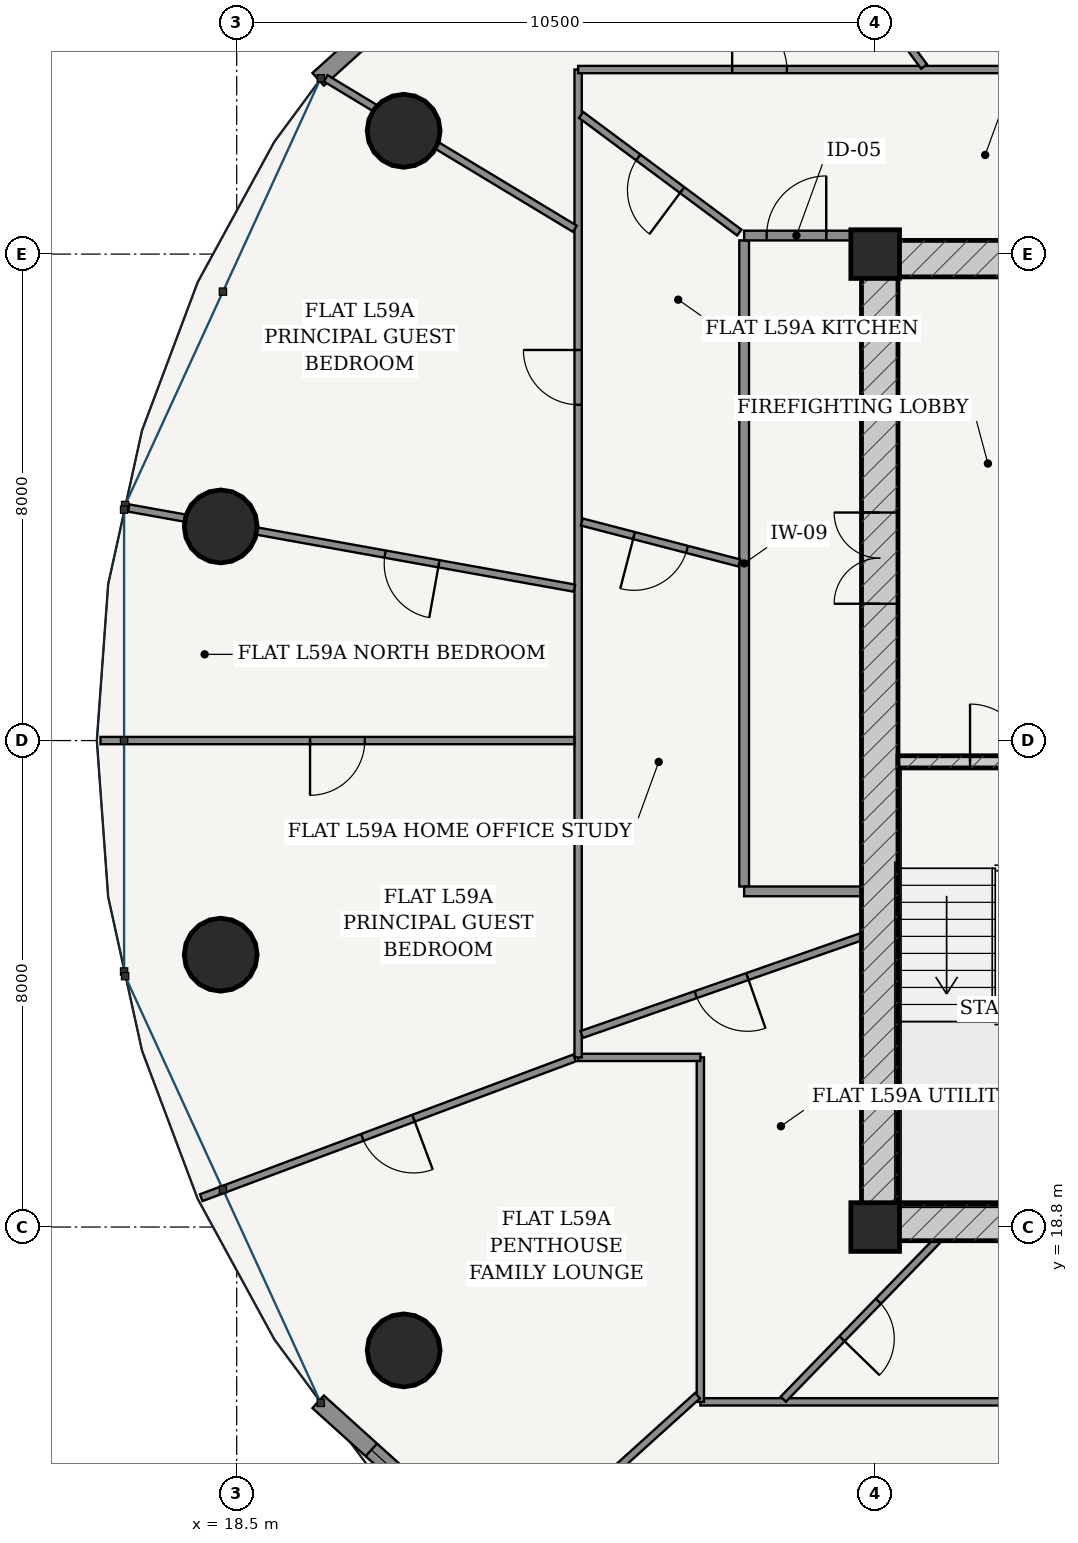
"""IFC4 building model, lengths in metres.
Left out: names, types, materials, properties, quantities, classifications, styles, units other than length and angle.
Written with IfcOpenShell. Run it as: python <this file> out.ifc"""

import sys

from ifc_helpers import new_model, si_unit, direction, frame, frame_2d, origin, origin_2d, place, context, subcontext, project, spatial, rectangle, hollow_circle, extrude, source, transform, mapped, element, fill, save


model = new_model("IFC4")
c1 = context("Model", 3, precision=1e-05, world=origin(), true_north=direction((-0.2419218956, 0.970295726276)))
c2 = subcontext(c1, "Body", "Model", "MODEL_VIEW")
j1 = project(units=[si_unit("LENGTHUNIT", "METRE"), si_unit("PLANEANGLEUNIT", "RADIAN")], contexts=[c1])
p1 = place(None, origin())
s1 = spatial("IfcSite", under=j1, at=p1, CompositionType="ELEMENT")
p2 = place(p1, origin())
s2 = spatial("IfcBuilding", under=s1, at=p2, CompositionType="ELEMENT")
p3 = place(p2, frame((0.0, 0.0, 224.5)))
s3 = spatial("IfcBuildingStorey", under=s2, at=p3, CompositionType="ELEMENT", Elevation=224.5)
for number, where, z_axis, x_axis in (
    (1, (29.0, 18.8, 0.0), (0.0, 0.0, 1.0), (1.0, 0.0, 0.0)),
    (2, (29.0, 34.8, 0.0), (0.0, 0.0, 1.0), (1.0, 0.0, 0.0)),
):
    element("IfcColumn", number, at=place(p3, frame(where, z_axis=z_axis, x_axis=x_axis)), inside=s3, PredefinedType="COLUMN", context=c2, shape_type="SweptSolid", body=[
        extrude(rectangle(XDim=0.8, YDim=0.8, at=origin_2d()), origin(), (0.0, 0.0, 1.0), 3.7),
    ])
p4 = place(p3, frame((28.775, 18.875, 0.0), z_axis=(0.0, 0.0, 1.0), x_axis=(1.0, 0.0, 0.0)))
e3 = element("IfcWall", 3, at=p4, inside=s3, PredefinedType="SHEAR", context=c2, shape_type="SweptSolid", body=[
    extrude(rectangle(XDim=18.45, YDim=0.6, at=frame_2d((9.225, 0.0))), origin(), (0.0, 0.0, 1.0), 3.435),
])
p5 = place(p4, frame((8.8, 0.0, 0.0)))
e4 = element("IfcOpeningElement", 4, at=p5, cuts=e3, PredefinedType="OPENING", context=c2, shape_type="SweptSolid", body=[
    extrude(rectangle(XDim=0.85, YDim=2.1, at=frame_2d((0.425, 1.05))), frame((0.0, 0.31, 0.0), z_axis=(0.0, -1.0, 0.0), x_axis=(1.0, 0.0, 0.0)), (0.0, 0.0, 1.0), 0.62),
])
p6 = place(p3, frame((28.775, 34.725, 0.0), z_axis=(0.0, 0.0, 1.0), x_axis=(1.0, 0.0, 0.0)))
e5 = element("IfcWall", 5, at=p6, inside=s3, PredefinedType="SHEAR", context=c2, shape_type="SweptSolid", body=[
    extrude(rectangle(XDim=18.45, YDim=0.6, at=frame_2d((9.225, 0.0))), origin(), (0.0, 0.0, 1.0), 3.435),
])
p7 = place(p3, frame((29.075, 19.175, 0.0), z_axis=(0.0, 0.0, 1.0), x_axis=(0.0, 1.0, 0.0)))
e6 = element("IfcWall", 6, at=p7, inside=s3, PredefinedType="SHEAR", context=c2, shape_type="SweptSolid", body=[
    extrude(rectangle(XDim=15.25, YDim=0.6, at=frame_2d((7.625, 0.0))), origin(), (0.0, 0.0, 1.0), 3.435),
])
p8 = place(p7, frame((9.875, 0.0, 0.0)))
e7 = element("IfcOpeningElement", 7, at=p8, cuts=e6, PredefinedType="OPENING", context=c2, shape_type="SweptSolid", body=[
    extrude(rectangle(XDim=1.5, YDim=2.2, at=frame_2d((0.75, 1.1))), frame((0.0, 0.31, 0.0), z_axis=(0.0, -1.0, 0.0), x_axis=(1.0, 0.0, 0.0)), (0.0, 0.0, 1.0), 0.62),
])
p9 = place(p3, frame((29.375, 26.45, 0.0), z_axis=(0.0, 0.0, 1.0), x_axis=(1.0, 0.0, 0.0)))
e8 = element("IfcWall", 8, at=p9, inside=s3, PredefinedType="SOLIDWALL", context=c2, shape_type="SweptSolid", body=[
    extrude(rectangle(XDim=3.32, YDim=0.2, at=frame_2d((1.66, 0.0))), origin(), (0.0, 0.0, 1.0), 3.435),
])
p10 = place(p9, frame((1.185, 0.0, 0.0)))
e9 = element("IfcOpeningElement", 9, at=p10, cuts=e8, PredefinedType="OPENING", context=c2, shape_type="SweptSolid", body=[
    extrude(rectangle(XDim=0.95, YDim=2.15, at=frame_2d((0.475, 1.075))), frame((0.0, 0.11, 0.0), z_axis=(0.0, -1.0, 0.0), x_axis=(1.0, 0.0, 0.0)), (0.0, 0.0, 1.0), 0.22),
])
for number, where, z_axis, x_axis in (
    (10, (21.246, 36.828, 0.0), (0.0, 0.0, 1.0), (1.0, 0.0, 0.0)),
    (11, (18.237, 30.321, 0.0), (0.0, 0.0, 1.0), (1.0, 0.0, 0.0)),
    (12, (18.237, 23.279, 0.0), (0.0, 0.0, 1.0), (1.0, 0.0, 0.0)),
    (13, (21.246, 16.772, 0.0), (0.0, 0.0, 1.0), (1.0, 0.0, 0.0)),
):
    element("IfcColumn", number, at=place(p3, frame(where, z_axis=z_axis, x_axis=x_axis)), inside=s3, PredefinedType="COLUMN", context=c2, shape_type="SweptSolid", body=[
        extrude(hollow_circle(Radius=0.6, WallThickness=0.038, at=origin_2d()), origin(), (0.0, 0.0, 1.0), 3.7),
    ])
p11 = place(p3, frame((25.965, 43.209, 0.0), z_axis=(0.0, 0.0, 1.0), x_axis=(-0.741972126783, -0.670430729514, 0.0)))
e14 = element("IfcWall", 14, at=p11, inside=s3, PredefinedType="SOLIDWALL", context=c2, shape_type="SweptSolid", body=[
    extrude(rectangle(XDim=8.255, YDim=0.28, at=frame_2d((4.127, 0.0))), origin(), (0.0, 0.0, 1.0), 3.435),
])
p12 = place(p11, frame((1.179, 0.0, 0.85)))
e15 = element("IfcOpeningElement", 15, at=p12, cuts=e14, PredefinedType="OPENING", context=c2, shape_type="SweptSolid", body=[
    extrude(rectangle(XDim=2.1, YDim=1.95, at=frame_2d((1.05, 0.975))), frame((0.0, 0.15, 0.0), z_axis=(0.0, -1.0, 0.0), x_axis=(1.0, 0.0, 0.0)), (0.0, 0.0, 1.0), 0.3),
])
p13 = place(p11, frame((4.976, 0.0, 0.85)))
e16 = element("IfcOpeningElement", 16, at=p13, cuts=e14, PredefinedType="OPENING", context=c2, shape_type="SweptSolid", body=[
    extrude(rectangle(XDim=2.1, YDim=1.95, at=frame_2d((1.05, 0.975))), frame((0.0, 0.15, 0.0), z_axis=(0.0, -1.0, 0.0), x_axis=(1.0, 0.0, 0.0)), (0.0, 0.0, 1.0), 0.3),
])
p14 = place(p3, frame((19.84, 15.926, 0.0), z_axis=(0.0, 0.0, 1.0), x_axis=(0.741986838603, -0.670414447443, 0.0)))
e17 = element("IfcWall", 17, at=p14, inside=s3, PredefinedType="SOLIDWALL", context=c2, shape_type="SweptSolid", body=[
    extrude(rectangle(XDim=8.255, YDim=0.28, at=frame_2d((4.127, 0.0))), origin(), (0.0, 0.0, 1.0), 3.435),
])
p15 = place(p14, frame((1.179, 0.0, 0.85)))
e18 = element("IfcOpeningElement", 18, at=p15, cuts=e17, PredefinedType="OPENING", context=c2, shape_type="SweptSolid", body=[
    extrude(rectangle(XDim=2.1, YDim=1.95, at=frame_2d((1.05, 0.975))), frame((0.0, 0.15, 0.0), z_axis=(0.0, -1.0, 0.0), x_axis=(1.0, 0.0, 0.0)), (0.0, 0.0, 1.0), 0.3),
])
p16 = place(p14, frame((4.976, 0.0, 0.85)))
e19 = element("IfcOpeningElement", 19, at=p16, cuts=e17, PredefinedType="OPENING", context=c2, shape_type="SweptSolid", body=[
    extrude(rectangle(XDim=2.1, YDim=1.95, at=frame_2d((1.05, 0.975))), frame((0.0, 0.15, 0.0), z_axis=(0.0, -1.0, 0.0), x_axis=(1.0, 0.0, 0.0)), (0.0, 0.0, 1.0), 0.3),
])
p17 = place(p3, frame((26.845, 24.4, 0.0), z_axis=(0.0, 0.0, 1.0), x_axis=(0.0, 1.0, 0.0)))
e20 = element("IfcWall", 20, at=p17, inside=s3, PredefinedType="PARTITIONING", context=c2, shape_type="SweptSolid", body=[
    extrude(rectangle(XDim=10.625, YDim=0.16, at=frame_2d((5.312, 0.0))), origin(), (0.0, 0.0, 1.0), 2.951),
])
p18 = place(p3, frame((26.845, 35.105, 0.0), z_axis=(0.0, 0.0, 1.0), x_axis=(1.0, 0.0, 0.0)))
e21 = element("IfcWall", 21, at=p18, inside=s3, PredefinedType="PARTITIONING", context=c2, shape_type="SweptSolid", body=[
    extrude(rectangle(XDim=1.93, YDim=0.16, at=frame_2d((0.965, 0.0))), origin(), (0.0, 0.0, 1.0), 3.435),
])
p19 = place(p18, frame((0.37, 0.0, 0.0)))
e22 = element("IfcOpeningElement", 22, at=p19, cuts=e21, PredefinedType="OPENING", context=c2, shape_type="SweptSolid", body=[
    extrude(rectangle(XDim=0.98, YDim=2.2, at=frame_2d((0.49, 1.1))), frame((0.0, 0.09, 0.0), z_axis=(0.0, -1.0, 0.0), x_axis=(1.0, 0.0, 0.0)), (0.0, 0.0, 1.0), 0.18),
])
p20 = place(p3, frame((26.845, 24.32, 0.0), z_axis=(0.0, 0.0, 1.0), x_axis=(1.0, 0.0, 0.0)))
e23 = element("IfcWall", 23, at=p20, inside=s3, PredefinedType="PARTITIONING", context=c2, shape_type="SweptSolid", body=[
    extrude(rectangle(XDim=1.93, YDim=0.16, at=frame_2d((0.965, 0.0))), origin(), (0.0, 0.0, 1.0), 3.435),
])
p21 = place(p3, frame((31.59, 15.925, 0.0), z_axis=(0.0, 0.0, 1.0), x_axis=(-1.0, 0.0, 0.0)))
e24 = element("IfcWall", 24, at=p21, inside=s3, PredefinedType="PARTITIONING", context=c2, shape_type="SweptSolid", body=[
    extrude(rectangle(XDim=5.465, YDim=0.12, at=frame_2d((2.732, 0.0))), origin(), (0.0, 0.0, 1.0), 2.951),
])
p22 = place(p3, frame((26.125, 15.925, 0.0), z_axis=(0.0, 0.0, 1.0), x_axis=(0.0, 1.0, 0.0)))
e25 = element("IfcWall", 25, at=p22, inside=s3, PredefinedType="PARTITIONING", context=c2, shape_type="SweptSolid", body=[
    extrude(rectangle(XDim=5.665, YDim=0.12, at=frame_2d((2.833, 0.0))), origin(), (0.0, 0.0, 1.0), 2.951),
])
p23 = place(p3, frame((26.125, 21.59, 0.0), z_axis=(0.0, 0.0, 1.0), x_axis=(-1.0, 0.0, 0.0)))
e26 = element("IfcWall", 26, at=p23, inside=s3, PredefinedType="PARTITIONING", context=c2, shape_type="SweptSolid", body=[
    extrude(rectangle(XDim=2.01, YDim=0.12, at=frame_2d((1.005, 0.0))), origin(), (0.0, 0.0, 1.0), 3.11),
])
p24 = place(p3, frame((24.115, 21.59, 0.0), z_axis=(0.0, 0.0, 1.0), x_axis=(0.0, 1.0, 0.0)))
e27 = element("IfcWall", 27, at=p24, inside=s3, PredefinedType="PARTITIONING", context=c2, shape_type="SweptSolid", body=[
    extrude(rectangle(XDim=16.245, YDim=0.12, at=frame_2d((8.123, 0.0))), origin(), (0.0, 0.0, 1.0), 2.951),
])
p25 = place(p24, frame((10.733, 0.0, 0.0)))
e28 = element("IfcOpeningElement", 28, at=p25, cuts=e27, PredefinedType="OPENING", context=c2, shape_type="SweptSolid", body=[
    extrude(rectangle(XDim=0.9, YDim=2.15, at=frame_2d((0.45, 1.075))), frame((0.0, 0.07, 0.0), z_axis=(0.0, -1.0, 0.0), x_axis=(1.0, 0.0, 0.0)), (0.0, 0.0, 1.0), 0.14),
])
p26 = place(p3, frame((24.115, 37.835, 0.0), z_axis=(0.0, 0.0, 1.0), x_axis=(1.0, 0.0, 0.0)))
e29 = element("IfcWall", 29, at=p26, inside=s3, PredefinedType="PARTITIONING", context=c2, shape_type="SweptSolid", body=[
    extrude(rectangle(XDim=7.47, YDim=0.12, at=frame_2d((3.735, 0.0))), origin(), (0.0, 0.0, 1.0), 2.951),
])
p27 = place(p26, frame((2.533, 0.0, 0.0)))
e30 = element("IfcOpeningElement", 30, at=p27, cuts=e29, PredefinedType="OPENING", context=c2, shape_type="SweptSolid", body=[
    extrude(rectangle(XDim=0.9, YDim=2.15, at=frame_2d((0.45, 1.075))), frame((0.0, 0.07, 0.0), z_axis=(0.0, -1.0, 0.0), x_axis=(1.0, 0.0, 0.0)), (0.0, 0.0, 1.0), 0.14),
])
p28 = place(p3, frame((29.804, 37.885, 0.0), z_axis=(0.0, 0.0, 1.0), x_axis=(-0.594507557292, 0.804090022524, 0.0)))
e31 = element("IfcWall", 31, at=p28, inside=s3, PredefinedType="PARTITIONING", context=c2, shape_type="SweptSolid", body=[
    extrude(rectangle(XDim=6.481, YDim=0.12, at=frame_2d((3.241, 0.0))), origin(), (0.0, 0.0, 1.0), 2.951),
])
p29 = place(p3, frame((24.062, 35.216, 0.0), z_axis=(0.0, 0.0, 1.0), x_axis=(-0.856058483833, 0.516878972543, 0.0)))
e32 = element("IfcWall", 32, at=p29, inside=s3, PredefinedType="PARTITIONING", context=c2, shape_type="SweptSolid", body=[
    extrude(rectangle(XDim=4.787, YDim=0.12, at=frame_2d((2.393, 0.0))), origin(), (0.0, 0.0, 1.0), 2.951),
])
p30 = place(p3, frame((24.054, 29.307, 0.0), z_axis=(0.0, 0.0, 1.0), x_axis=(-0.984227185588, 0.176909149424, 0.0)))
e33 = element("IfcWall", 33, at=p30, inside=s3, PredefinedType="PARTITIONING", context=c2, shape_type="SweptSolid", body=[
    extrude(rectangle(XDim=7.448, YDim=0.12, at=frame_2d((3.724, 0.0))), origin(), (0.0, 0.0, 1.0), 2.951),
])
p31 = place(p30, frame((2.264, 0.0, 0.0)))
e34 = element("IfcOpeningElement", 34, at=p31, cuts=e33, PredefinedType="OPENING", context=c2, shape_type="SweptSolid", body=[
    extrude(rectangle(XDim=0.9, YDim=2.15, at=frame_2d((0.45, 1.075))), frame((0.0, 0.07, 0.0), z_axis=(0.0, -1.0, 0.0), x_axis=(1.0, 0.0, 0.0)), (0.0, 0.0, 1.0), 0.14),
])
p32 = place(p3, frame((24.053, 26.8, 0.0), z_axis=(0.0, 0.0, 1.0), x_axis=(-1.0, 0.0, 0.0)))
e35 = element("IfcWall", 35, at=p32, inside=s3, PredefinedType="PARTITIONING", context=c2, shape_type="SweptSolid", body=[
    extrude(rectangle(XDim=7.793, YDim=0.12, at=frame_2d((3.896, 0.0))), origin(), (0.0, 0.0, 1.0), 2.951),
])
p33 = place(p32, frame((3.447, 0.0, 0.0)))
e36 = element("IfcOpeningElement", 36, at=p33, cuts=e35, PredefinedType="OPENING", context=c2, shape_type="SweptSolid", body=[
    extrude(rectangle(XDim=0.9, YDim=2.15, at=frame_2d((0.45, 1.075))), frame((0.0, 0.07, 0.0), z_axis=(0.0, -1.0, 0.0), x_axis=(1.0, 0.0, 0.0)), (0.0, 0.0, 1.0), 0.14),
])
p34 = place(p3, frame((24.057, 21.581, 0.0), z_axis=(0.0, 0.0, 1.0), x_axis=(-0.936527968377, -0.350592875637, 0.0)))
e37 = element("IfcWall", 37, at=p34, inside=s3, PredefinedType="PARTITIONING", context=c2, shape_type="SweptSolid", body=[
    extrude(rectangle(XDim=6.556, YDim=0.12, at=frame_2d((3.278, 0.0))), origin(), (0.0, 0.0, 1.0), 2.951),
])
p35 = place(p34, frame((2.828, 0.0, 0.0)))
e38 = element("IfcOpeningElement", 38, at=p35, cuts=e37, PredefinedType="OPENING", context=c2, shape_type="SweptSolid", body=[
    extrude(rectangle(XDim=0.9, YDim=2.15, at=frame_2d((0.45, 1.075))), frame((0.0, 0.07, 0.0), z_axis=(0.0, -1.0, 0.0), x_axis=(1.0, 0.0, 0.0)), (0.0, 0.0, 1.0), 0.14),
])
p36 = place(p3, frame((26.079, 16.027, 0.0), z_axis=(0.0, 0.0, 1.0), x_axis=(-0.741950057395, -0.67045515311, 0.0)))
e39 = element("IfcWall", 39, at=p36, inside=s3, PredefinedType="PARTITIONING", context=c2, shape_type="SweptSolid", body=[
    extrude(rectangle(XDim=4.647, YDim=0.12, at=frame_2d((2.324, 0.0))), origin(), (0.0, 0.0, 1.0), 2.951),
])
p37 = place(p36, frame((1.874, 0.0, 0.0)))
e40 = element("IfcOpeningElement", 40, at=p37, cuts=e39, PredefinedType="OPENING", context=c2, shape_type="SweptSolid", body=[
    extrude(rectangle(XDim=0.9, YDim=2.15, at=frame_2d((0.45, 1.075))), frame((0.0, 0.07, 0.0), z_axis=(0.0, -1.0, 0.0), x_axis=(1.0, 0.0, 0.0)), (0.0, 0.0, 1.0), 0.14),
])
p38 = place(p3, frame((26.765, 35.154, 0.0), z_axis=(0.0, 0.0, 1.0), x_axis=(-0.802434587752, 0.596740087793, 0.0)))
e41 = element("IfcWall", 41, at=p38, inside=s3, PredefinedType="PARTITIONING", context=c2, shape_type="SweptSolid", body=[
    extrude(rectangle(XDim=3.24, YDim=0.12, at=frame_2d((1.62, 0.0))), origin(), (0.0, 0.0, 1.0), 3.11),
])
p39 = place(p38, frame((1.17, 0.0, 0.0)))
e42 = element("IfcOpeningElement", 42, at=p39, cuts=e41, PredefinedType="OPENING", context=c2, shape_type="SweptSolid", body=[
    extrude(rectangle(XDim=0.9, YDim=2.15, at=frame_2d((0.45, 1.075))), frame((0.0, 0.07, 0.0), z_axis=(0.0, -1.0, 0.0), x_axis=(1.0, 0.0, 0.0)), (0.0, 0.0, 1.0), 0.14),
])
p40 = place(p3, frame((26.765, 29.721, 0.0), z_axis=(0.0, 0.0, 1.0), x_axis=(-0.967824284298, 0.251627015092, 0.0)))
e43 = element("IfcWall", 43, at=p40, inside=s3, PredefinedType="PARTITIONING", context=c2, shape_type="SweptSolid", body=[
    extrude(rectangle(XDim=2.676, YDim=0.12, at=frame_2d((1.338, 0.0))), origin(), (0.0, 0.0, 1.0), 3.435),
])
p41 = place(p40, frame((0.888, 0.0, 0.0)))
e44 = element("IfcOpeningElement", 44, at=p41, cuts=e43, PredefinedType="OPENING", context=c2, shape_type="SweptSolid", body=[
    extrude(rectangle(XDim=0.9, YDim=2.15, at=frame_2d((0.45, 1.075))), frame((0.0, 0.07, 0.0), z_axis=(0.0, -1.0, 0.0), x_axis=(1.0, 0.0, 0.0)), (0.0, 0.0, 1.0), 0.14),
])
p42 = place(p3, frame((28.775, 23.575, 0.0), z_axis=(0.0, 0.0, 1.0), x_axis=(-0.943974645063, -0.330017983569, 0.0)))
e45 = element("IfcWall", 45, at=p42, inside=s3, PredefinedType="PARTITIONING", context=c2, shape_type="SweptSolid", body=[
    extrude(rectangle(XDim=4.875, YDim=0.12, at=frame_2d((2.437, 0.0))), origin(), (0.0, 0.0, 1.0), 3.11),
])
p43 = place(p42, frame((1.987, 0.0, 0.0)))
e46 = element("IfcOpeningElement", 46, at=p43, cuts=e45, PredefinedType="OPENING", context=c2, shape_type="SweptSolid", body=[
    extrude(rectangle(XDim=0.9, YDim=2.15, at=frame_2d((0.45, 1.075))), frame((0.0, 0.07, 0.0), z_axis=(0.0, -1.0, 0.0), x_axis=(1.0, 0.0, 0.0)), (0.0, 0.0, 1.0), 0.14),
])
p44 = place(p3, frame((30.018, 18.575, 0.0), z_axis=(0.0, 0.0, 1.0), x_axis=(-0.696436677683, -0.717618250867, 0.0)))
e47 = element("IfcWall", 47, at=p44, inside=s3, PredefinedType="PARTITIONING", context=c2, shape_type="SweptSolid", body=[
    extrude(rectangle(XDim=3.631, YDim=0.12, at=frame_2d((1.815, 0.0))), origin(), (0.0, 0.0, 1.0), 2.951),
])
p45 = place(p44, frame((1.385, 0.0, 0.0)))
e48 = element("IfcOpeningElement", 48, at=p45, cuts=e47, PredefinedType="OPENING", context=c2, shape_type="SweptSolid", body=[
    extrude(rectangle(XDim=0.86, YDim=2.15, at=frame_2d((0.43, 1.075))), frame((0.0, 0.07, 0.0), z_axis=(0.0, -1.0, 0.0), x_axis=(1.0, 0.0, 0.0)), (0.0, 0.0, 1.0), 0.14),
])
m1 = source(origin(), c2, "Body", "SweptSolid", [
    extrude(rectangle(XDim=2.1, YDim=1.95, at=frame_2d((1.05, 0.975))), frame((0.0, 0.03, 0.0), z_axis=(0.0, -1.0, 0.0), x_axis=(1.0, 0.0, 0.0)), (0.0, 0.0, 1.0), 0.06),
])
p46 = place(p15, origin())
e49 = element("IfcWindow", 49, at=p46, inside=s3, PartitioningType="SINGLE_PANEL", PredefinedType="WINDOW", context=c2, shape_type="MappedRepresentation", body=[
    mapped(m1, transform((0.0, 0.0, 0.0), scale=1.0)),
])
fill(e18, e49)
m2 = source(origin(), c2, "Body", "SweptSolid", [
    extrude(rectangle(XDim=1.5, YDim=2.2, at=frame_2d((0.75, 1.1))), frame((0.0, 0.025, 0.0), z_axis=(0.0, -1.0, 0.0), x_axis=(1.0, 0.0, 0.0)), (0.0, 0.0, 1.0), 0.05),
])
p47 = place(p8, origin())
e50 = element("IfcDoor", 50, at=p47, inside=s3, OperationType="DOUBLE_DOOR_SINGLE_SWING", PredefinedType="DOOR", context=c2, shape_type="MappedRepresentation", body=[
    mapped(m2, transform((0.0, 0.0, 0.0), scale=1.0)),
])
fill(e7, e50)
m3 = source(origin(), c2, "Body", "SweptSolid", [
    extrude(rectangle(XDim=0.95, YDim=2.15, at=frame_2d((0.475, 1.075))), frame((0.0, 0.025, 0.0), z_axis=(0.0, -1.0, 0.0), x_axis=(1.0, 0.0, 0.0)), (0.0, 0.0, 1.0), 0.05),
])
p48 = place(p10, origin())
e51 = element("IfcDoor", 51, at=p48, inside=s3, OperationType="SINGLE_SWING_LEFT", PredefinedType="DOOR", context=c2, shape_type="MappedRepresentation", body=[
    mapped(m3, transform((0.0, 0.0, 0.0), scale=1.0)),
])
fill(e9, e51)
m4 = source(origin(), c2, "Body", "SweptSolid", [
    extrude(rectangle(XDim=0.98, YDim=2.2, at=frame_2d((0.49, 1.1))), frame((0.0, 0.025, 0.0), z_axis=(0.0, -1.0, 0.0), x_axis=(1.0, 0.0, 0.0)), (0.0, 0.0, 1.0), 0.05),
])
p49 = place(p19, origin())
e52 = element("IfcDoor", 52, at=p49, inside=s3, OperationType="SINGLE_SWING_RIGHT", PredefinedType="DOOR", context=c2, shape_type="MappedRepresentation", body=[
    mapped(m4, transform((0.0, 0.0, 0.0), scale=1.0)),
])
fill(e22, e52)
m5 = source(origin(), c2, "Body", "SweptSolid", [
    extrude(rectangle(XDim=0.9, YDim=2.15, at=frame_2d((0.45, 1.075))), frame((0.0, 0.025, 0.0), z_axis=(0.0, -1.0, 0.0), x_axis=(1.0, 0.0, 0.0)), (0.0, 0.0, 1.0), 0.05),
])
p50 = place(p39, origin())
e53 = element("IfcDoor", 53, at=p50, inside=s3, OperationType="SINGLE_SWING_LEFT", PredefinedType="DOOR", context=c2, shape_type="MappedRepresentation", body=[
    mapped(m5, transform((0.0, 0.0, 0.0), scale=1.0)),
])
fill(e42, e53)
p51 = place(p41, origin())
e54 = element("IfcDoor", 54, at=p51, inside=s3, OperationType="SINGLE_SWING_RIGHT", PredefinedType="DOOR", context=c2, shape_type="MappedRepresentation", body=[
    mapped(m5, transform((0.0, 0.0, 0.0), scale=1.0)),
])
fill(e44, e54)
p52 = place(p43, origin())
e55 = element("IfcDoor", 55, at=p52, inside=s3, OperationType="SINGLE_SWING_LEFT", PredefinedType="DOOR", context=c2, shape_type="MappedRepresentation", body=[
    mapped(m5, transform((0.0, 0.0, 0.0), scale=1.0)),
])
fill(e46, e55)
m6 = source(origin(), c2, "Body", "SweptSolid", [
    extrude(rectangle(XDim=0.86, YDim=2.15, at=frame_2d((0.43, 1.075))), frame((0.0, 0.025, 0.0), z_axis=(0.0, -1.0, 0.0), x_axis=(1.0, 0.0, 0.0)), (0.0, 0.0, 1.0), 0.05),
])
p53 = place(p45, origin())
e56 = element("IfcDoor", 56, at=p53, inside=s3, OperationType="SINGLE_SWING_RIGHT", PredefinedType="DOOR", context=c2, shape_type="MappedRepresentation", body=[
    mapped(m6, transform((0.0, 0.0, 0.0), scale=1.0)),
])
fill(e48, e56)
p54 = place(p27, origin())
e57 = element("IfcDoor", 57, at=p54, inside=s3, OperationType="SINGLE_SWING_LEFT", PredefinedType="DOOR", context=c2, shape_type="MappedRepresentation", body=[
    mapped(m5, transform((0.0, 0.0, 0.0), scale=1.0)),
])
fill(e30, e57)
p55 = place(p25, origin())
e58 = element("IfcDoor", 58, at=p55, inside=s3, OperationType="SINGLE_SWING_RIGHT", PredefinedType="DOOR", context=c2, shape_type="MappedRepresentation", body=[
    mapped(m5, transform((0.0, 0.0, 0.0), scale=1.0)),
])
fill(e28, e58)
p56 = place(p31, origin())
e59 = element("IfcDoor", 59, at=p56, inside=s3, OperationType="SINGLE_SWING_LEFT", PredefinedType="DOOR", context=c2, shape_type="MappedRepresentation", body=[
    mapped(m5, transform((0.0, 0.0, 0.0), scale=1.0)),
])
fill(e34, e59)
p57 = place(p33, origin())
e60 = element("IfcDoor", 60, at=p57, inside=s3, OperationType="SINGLE_SWING_RIGHT", PredefinedType="DOOR", context=c2, shape_type="MappedRepresentation", body=[
    mapped(m5, transform((0.0, 0.0, 0.0), scale=1.0)),
])
fill(e36, e60)
p58 = place(p35, origin())
e61 = element("IfcDoor", 61, at=p58, inside=s3, OperationType="SINGLE_SWING_LEFT", PredefinedType="DOOR", context=c2, shape_type="MappedRepresentation", body=[
    mapped(m5, transform((0.0, 0.0, 0.0), scale=1.0)),
])
fill(e38, e61)
save(model, sys.argv[1])
